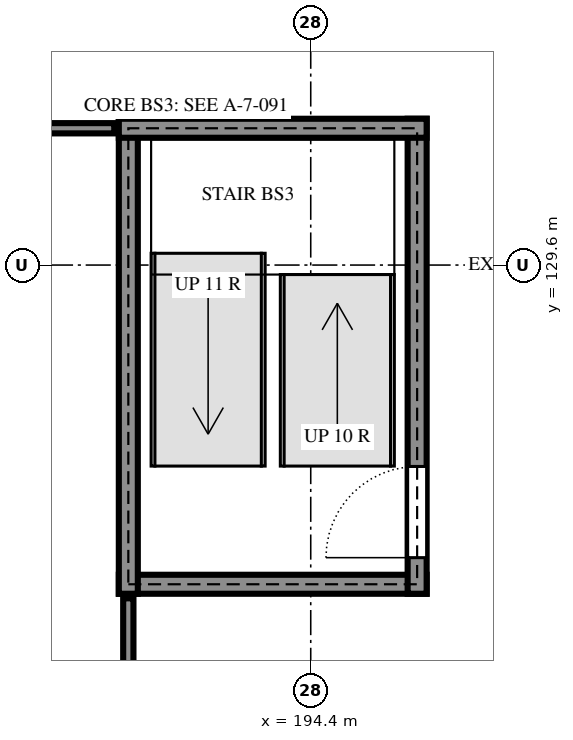
"""IFC4 building model, lengths in metres.
Left out: names, types, materials, properties, quantities, classifications, styles, units other than length and angle.
Written with IfcOpenShell. Run it as: python <this file> out.ifc"""

import sys

from ifc_helpers import new_model, si_unit, direction, frame, frame_2d, origin, place, context, subcontext, project, spatial, rectangle, extrude, element, fill, save


model = new_model("IFC4")
c1 = context("Model", 3, precision=1e-05, world=origin(), true_north=direction((0.0, 1.0)))
c2 = subcontext(c1, "Body", "Model", "MODEL_VIEW")
j1 = project(units=[si_unit("LENGTHUNIT", "METRE"), si_unit("PLANEANGLEUNIT", "RADIAN")], contexts=[c1])
p1 = place(None, origin())
s1 = spatial("IfcSite", under=j1, at=p1, CompositionType="ELEMENT")
p2 = place(p1, origin())
s2 = spatial("IfcBuilding", under=s1, at=p2, CompositionType="ELEMENT")
p3 = place(p2, frame((0.0, 0.0, 3.6)))
s3 = spatial("IfcBuildingStorey", under=s2, at=p3, CompositionType="ELEMENT", Elevation=3.6)
p4 = place(p3, frame((191.875, 125.4, 0.0), z_axis=(0.0, 0.0, 1.0), x_axis=(1.0, 0.0, 0.0)))
e1 = element("IfcWall", 1, at=p4, inside=s3, PredefinedType="SHEAR", context=c2, shape_type="SweptSolid", body=[
    extrude(rectangle(XDim=4.05, YDim=0.25, at=frame_2d((2.025, 0.0))), origin(), (0.0, 0.0, 1.0), 3.6),
])
p5 = place(p3, frame((195.8, 125.275, 0.0), z_axis=(0.0, 0.0, 1.0), x_axis=(0.0, 1.0, 0.0)))
e2 = element("IfcWall", 2, at=p5, inside=s3, PredefinedType="SHEAR", context=c2, shape_type="SweptSolid", body=[
    extrude(rectangle(XDim=6.25, YDim=0.25, at=frame_2d((3.125, 0.0))), origin(), (0.0, 0.0, 1.0), 3.6),
])
p6 = place(p5, frame((0.475, 0.0, 0.0)))
e3 = element("IfcOpeningElement", 3, at=p6, cuts=e2, PredefinedType="OPENING", context=c2, shape_type="SweptSolid", body=[
    extrude(rectangle(XDim=1.2, YDim=2.4, at=frame_2d((0.6, 1.2))), frame((0.0, 0.135, 0.0), z_axis=(0.0, -1.0, 0.0), x_axis=(1.0, 0.0, 0.0)), (0.0, 0.0, 1.0), 0.27),
])
p7 = place(p3, frame((192.0, 131.525, 0.0), z_axis=(0.0, 0.0, 1.0), x_axis=(0.0, -1.0, 0.0)))
e4 = element("IfcWall", 4, at=p7, inside=s3, PredefinedType="SHEAR", context=c2, shape_type="SweptSolid", body=[
    extrude(rectangle(XDim=6.25, YDim=0.25, at=frame_2d((3.125, 0.0))), origin(), (0.0, 0.0, 1.0), 3.6),
])
p8 = place(p3, frame((195.925, 131.4, 0.0), z_axis=(0.0, 0.0, 1.0), x_axis=(-1.0, 0.0, 0.0)))
e5 = element("IfcWall", 5, at=p8, inside=s3, PredefinedType="SHEAR", context=c2, shape_type="SweptSolid", body=[
    extrude(rectangle(XDim=4.05, YDim=0.25, at=frame_2d((2.025, 0.0))), origin(), (0.0, 0.0, 1.0), 3.6),
])
p9 = place(p3, frame((192.0, 122.55, 0.0), z_axis=(0.0, 0.0, 1.0), x_axis=(0.0, 1.0, 0.0)))
e6 = element("IfcWall", 6, at=p9, inside=s3, PredefinedType="PARTITIONING", context=c2, shape_type="SweptSolid", body=[
    extrude(rectangle(XDim=2.665, YDim=0.135, at=frame_2d((1.333, 0.0))), origin(), (0.0, 0.0, 1.0), 3.38),
])
p10 = place(p3, frame((191.815, 131.4, 0.0), z_axis=(0.0, 0.0, 1.0), x_axis=(-1.0, 0.0, 0.0)))
e7 = element("IfcWall", 7, at=p10, inside=s3, PredefinedType="PARTITIONING", context=c2, shape_type="SweptSolid", body=[
    extrude(rectangle(XDim=11.882, YDim=0.135, at=frame_2d((5.941, 0.0))), origin(), (0.0, 0.0, 1.0), 3.38),
])
p11 = place(p10, frame((5.45, 0.0, 0.0)))
e8 = element("IfcOpeningElement", 8, at=p11, cuts=e7, PredefinedType="OPENING", context=c2, shape_type="SweptSolid", body=[
    extrude(rectangle(XDim=1.0, YDim=2.4, at=frame_2d((0.5, 1.2))), frame((0.0, 0.077, 0.0), z_axis=(0.0, -1.0, 0.0), x_axis=(1.0, 0.0, 0.0)), (0.0, 0.0, 1.0), 0.155),
])
p12 = place(p6, origin())
e9 = element("IfcDoor", 9, at=p12, inside=s3, OperationType="SINGLE_SWING_RIGHT", PredefinedType="DOOR", context=c2, shape_type="SweptSolid", body=[
    extrude(rectangle(XDim=1.2, YDim=2.4, at=frame_2d((0.6, 1.2))), frame((0.0, 0.025, 0.0), z_axis=(0.0, -1.0, 0.0), x_axis=(1.0, 0.0, 0.0)), (0.0, 0.0, 1.0), 0.05),
])
fill(e3, e9)
save(model, sys.argv[1])
